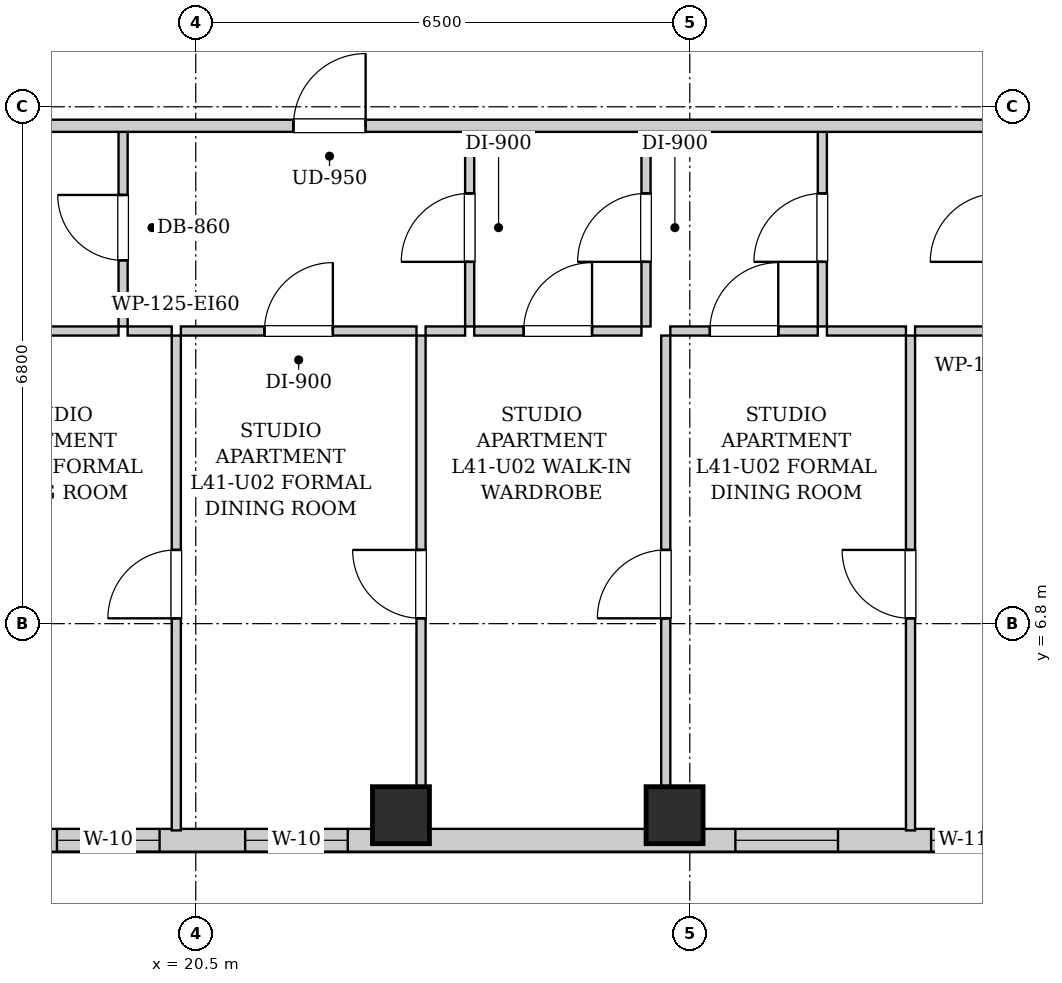
"""IFC4 building model, lengths in metres.
Left out: names, types, materials, properties, quantities, classifications, styles, units other than length and angle.
Written with IfcOpenShell. Run it as: python <this file> out.ifc"""

import sys

from ifc_helpers import new_model, si_unit, direction, frame, frame_2d, origin, origin_2d, place, context, subcontext, project, spatial, rectangle, extrude, element, fill, save


model = new_model("IFC4")
c1 = context("Model", 3, precision=1e-05, world=origin(), true_north=direction((0.0, 1.0)))
c2 = subcontext(c1, "Body", "Model", "MODEL_VIEW")
j1 = project(units=[si_unit("LENGTHUNIT", "METRE"), si_unit("PLANEANGLEUNIT", "RADIAN")], contexts=[c1])
p1 = place(None, origin())
s1 = spatial("IfcSite", under=j1, at=p1, CompositionType="ELEMENT")
p2 = place(p1, origin())
s2 = spatial("IfcBuilding", under=s1, at=p2, CompositionType="ELEMENT")
p3 = place(p2, frame((0.0, 0.0, 143.9)))
s3 = spatial("IfcBuildingStorey", under=s2, at=p3, CompositionType="ELEMENT", Elevation=143.9)
for number, where, z_axis, x_axis in (
    (1, (23.2, 4.28, 0.0), (0.0, 0.0, 1.0), (1.0, 0.0, 0.0)),
    (2, (26.8, 4.28, 0.0), (0.0, 0.0, 1.0), (1.0, 0.0, 0.0)),
):
    element("IfcColumn", number, at=place(p3, frame(where, z_axis=z_axis, x_axis=x_axis)), inside=s3, PredefinedType="COLUMN", context=c2, shape_type="SweptSolid", body=[
        extrude(rectangle(XDim=0.75, YDim=0.75, at=origin_2d()), origin(), (0.0, 0.0, 1.0), 3.25),
    ])
p4 = place(p3, frame((31.5, 3.95, 0.0), z_axis=(0.0, 0.0, 1.0), x_axis=(-1.0, 0.0, 0.0)))
e3 = element("IfcWall", 3, at=p4, inside=s3, PredefinedType="SOLIDWALL", context=c2, shape_type="SweptSolid", body=[
    extrude(rectangle(XDim=13.2, YDim=0.3, at=frame_2d((6.6, 0.0))), origin(), (0.0, 0.0, 1.0), 2.99),
])
p5 = place(p4, frame((11.476, 0.0, 0.55)))
e4 = element("IfcOpeningElement", 4, at=p5, cuts=e3, PredefinedType="OPENING", context=c2, shape_type="SweptSolid", body=[
    extrude(rectangle(XDim=1.35, YDim=1.2, at=frame_2d((0.675, 0.6))), frame((0.0, 0.16, 0.0), z_axis=(0.0, -1.0, 0.0), x_axis=(1.0, 0.0, 0.0)), (0.0, 0.0, 1.0), 0.32),
])
p6 = place(p4, frame((9.0, 0.0, 0.55)))
e5 = element("IfcOpeningElement", 5, at=p6, cuts=e3, PredefinedType="OPENING", context=c2, shape_type="SweptSolid", body=[
    extrude(rectangle(XDim=1.35, YDim=1.2, at=frame_2d((0.675, 0.6))), frame((0.0, 0.16, 0.0), z_axis=(0.0, -1.0, 0.0), x_axis=(1.0, 0.0, 0.0)), (0.0, 0.0, 1.0), 0.32),
])
p7 = place(p4, frame((2.55, 0.0, 0.55)))
e6 = element("IfcOpeningElement", 6, at=p7, cuts=e3, PredefinedType="OPENING", context=c2, shape_type="SweptSolid", body=[
    extrude(rectangle(XDim=1.35, YDim=1.2, at=frame_2d((0.675, 0.6))), frame((0.0, 0.16, 0.0), z_axis=(0.0, -1.0, 0.0), x_axis=(1.0, 0.0, 0.0)), (0.0, 0.0, 1.0), 0.32),
])
p8 = place(p4, frame((0.475, 0.0, 0.55)))
e7 = element("IfcOpeningElement", 7, at=p8, cuts=e3, PredefinedType="OPENING", context=c2, shape_type="SweptSolid", body=[
    extrude(rectangle(XDim=0.85, YDim=1.2, at=frame_2d((0.425, 0.6))), frame((0.0, 0.16, 0.0), z_axis=(0.0, -1.0, 0.0), x_axis=(1.0, 0.0, 0.0)), (0.0, 0.0, 1.0), 0.32),
])
p9 = place(p3, frame((19.544, 10.71, 0.0), z_axis=(0.0, 0.0, 1.0), x_axis=(0.0, 1.0, 0.0)))
e8 = element("IfcWall", 8, at=p9, inside=s3, PredefinedType="PARTITIONING", context=c2, shape_type="SweptSolid", body=[
    extrude(rectangle(XDim=2.6, YDim=0.12, at=frame_2d((1.3, 0.0))), origin(), (0.0, 0.0, 1.0), 2.99),
])
p10 = place(p9, frame((0.87, 0.0, 0.0)))
e9 = element("IfcOpeningElement", 9, at=p10, cuts=e8, PredefinedType="OPENING", context=c2, shape_type="SweptSolid", body=[
    extrude(rectangle(XDim=0.86, YDim=2.05, at=frame_2d((0.43, 1.025))), frame((0.0, 0.07, 0.0), z_axis=(0.0, -1.0, 0.0), x_axis=(1.0, 0.0, 0.0)), (0.0, 0.0, 1.0), 0.14),
])
p11 = place(p3, frame((17.084, 10.65, 0.0), z_axis=(0.0, 0.0, 1.0), x_axis=(1.0, 0.0, 0.0)))
e10 = element("IfcWall", 10, at=p11, inside=s3, PredefinedType="PARTITIONING", context=c2, shape_type="SweptSolid", body=[
    extrude(rectangle(XDim=2.4, YDim=0.12, at=frame_2d((1.2, 0.0))), origin(), (0.0, 0.0, 1.0), 2.99),
])
p12 = place(p3, frame((24.104, 10.71, 0.0), z_axis=(0.0, 0.0, 1.0), x_axis=(0.0, 1.0, 0.0)))
e11 = element("IfcWall", 11, at=p12, inside=s3, PredefinedType="PARTITIONING", context=c2, shape_type="SweptSolid", body=[
    extrude(rectangle(XDim=2.6, YDim=0.12, at=frame_2d((1.3, 0.0))), origin(), (0.0, 0.0, 1.0), 2.99),
])
p13 = place(p12, frame((0.85, 0.0, 0.0)))
e12 = element("IfcOpeningElement", 12, at=p13, cuts=e11, PredefinedType="OPENING", context=c2, shape_type="SweptSolid", body=[
    extrude(rectangle(XDim=0.9, YDim=2.05, at=frame_2d((0.45, 1.025))), frame((0.0, 0.07, 0.0), z_axis=(0.0, -1.0, 0.0), x_axis=(1.0, 0.0, 0.0)), (0.0, 0.0, 1.0), 0.14),
])
p14 = place(p3, frame((19.604, 10.65, 0.0), z_axis=(0.0, 0.0, 1.0), x_axis=(1.0, 0.0, 0.0)))
e13 = element("IfcWall", 13, at=p14, inside=s3, PredefinedType="PARTITIONING", context=c2, shape_type="SweptSolid", body=[
    extrude(rectangle(XDim=0.58, YDim=0.12, at=frame_2d((0.29, 0.0))), origin(), (0.0, 0.0, 1.0), 2.99),
])
p15 = place(p3, frame((20.304, 10.65, 0.0), z_axis=(0.0, 0.0, 1.0), x_axis=(1.0, 0.0, 0.0)))
e14 = element("IfcWall", 14, at=p15, inside=s3, PredefinedType="PARTITIONING", context=c2, shape_type="SweptSolid", body=[
    extrude(rectangle(XDim=3.1, YDim=0.12, at=frame_2d((1.55, 0.0))), origin(), (0.0, 0.0, 1.0), 2.99),
])
p16 = place(p15, frame((1.1, 0.0, 0.0)))
e15 = element("IfcOpeningElement", 15, at=p16, cuts=e14, PredefinedType="OPENING", context=c2, shape_type="SweptSolid", body=[
    extrude(rectangle(XDim=0.9, YDim=2.05, at=frame_2d((0.45, 1.025))), frame((0.0, 0.07, 0.0), z_axis=(0.0, -1.0, 0.0), x_axis=(1.0, 0.0, 0.0)), (0.0, 0.0, 1.0), 0.14),
])
p17 = place(p3, frame((23.524, 10.65, 0.0), z_axis=(0.0, 0.0, 1.0), x_axis=(1.0, 0.0, 0.0)))
e16 = element("IfcWall", 16, at=p17, inside=s3, PredefinedType="PARTITIONING", context=c2, shape_type="SweptSolid", body=[
    extrude(rectangle(XDim=0.52, YDim=0.12, at=frame_2d((0.26, 0.0))), origin(), (0.0, 0.0, 1.0), 2.99),
])
p18 = place(p3, frame((26.424, 10.71, 0.0), z_axis=(0.0, 0.0, 1.0), x_axis=(0.0, 1.0, 0.0)))
e17 = element("IfcWall", 17, at=p18, inside=s3, PredefinedType="PARTITIONING", context=c2, shape_type="SweptSolid", body=[
    extrude(rectangle(XDim=2.6, YDim=0.12, at=frame_2d((1.3, 0.0))), origin(), (0.0, 0.0, 1.0), 2.99),
])
p19 = place(p18, frame((0.85, 0.0, 0.0)))
e18 = element("IfcOpeningElement", 18, at=p19, cuts=e17, PredefinedType="OPENING", context=c2, shape_type="SweptSolid", body=[
    extrude(rectangle(XDim=0.9, YDim=2.05, at=frame_2d((0.45, 1.025))), frame((0.0, 0.07, 0.0), z_axis=(0.0, -1.0, 0.0), x_axis=(1.0, 0.0, 0.0)), (0.0, 0.0, 1.0), 0.14),
])
p20 = place(p3, frame((24.164, 10.65, 0.0), z_axis=(0.0, 0.0, 1.0), x_axis=(1.0, 0.0, 0.0)))
e19 = element("IfcWall", 19, at=p20, inside=s3, PredefinedType="PARTITIONING", context=c2, shape_type="SweptSolid", body=[
    extrude(rectangle(XDim=2.2, YDim=0.12, at=frame_2d((1.1, 0.0))), origin(), (0.0, 0.0, 1.0), 2.99),
])
p21 = place(p20, frame((0.65, 0.0, 0.0)))
e20 = element("IfcOpeningElement", 20, at=p21, cuts=e19, PredefinedType="OPENING", context=c2, shape_type="SweptSolid", body=[
    extrude(rectangle(XDim=0.9, YDim=2.05, at=frame_2d((0.45, 1.025))), frame((0.0, 0.07, 0.0), z_axis=(0.0, -1.0, 0.0), x_axis=(1.0, 0.0, 0.0)), (0.0, 0.0, 1.0), 0.14),
])
p22 = place(p3, frame((28.744, 10.71, 0.0), z_axis=(0.0, 0.0, 1.0), x_axis=(0.0, 1.0, 0.0)))
e21 = element("IfcWall", 21, at=p22, inside=s3, PredefinedType="PARTITIONING", context=c2, shape_type="SweptSolid", body=[
    extrude(rectangle(XDim=2.6, YDim=0.12, at=frame_2d((1.3, 0.0))), origin(), (0.0, 0.0, 1.0), 2.99),
])
p23 = place(p22, frame((0.85, 0.0, 0.0)))
e22 = element("IfcOpeningElement", 22, at=p23, cuts=e21, PredefinedType="OPENING", context=c2, shape_type="SweptSolid", body=[
    extrude(rectangle(XDim=0.9, YDim=2.05, at=frame_2d((0.45, 1.025))), frame((0.0, 0.07, 0.0), z_axis=(0.0, -1.0, 0.0), x_axis=(1.0, 0.0, 0.0)), (0.0, 0.0, 1.0), 0.14),
])
p24 = place(p3, frame((26.744, 10.65, 0.0), z_axis=(0.0, 0.0, 1.0), x_axis=(1.0, 0.0, 0.0)))
e23 = element("IfcWall", 23, at=p24, inside=s3, PredefinedType="PARTITIONING", context=c2, shape_type="SweptSolid", body=[
    extrude(rectangle(XDim=1.94, YDim=0.12, at=frame_2d((0.97, 0.0))), origin(), (0.0, 0.0, 1.0), 2.99),
])
p25 = place(p24, frame((0.52, 0.0, 0.0)))
e24 = element("IfcOpeningElement", 24, at=p25, cuts=e23, PredefinedType="OPENING", context=c2, shape_type="SweptSolid", body=[
    extrude(rectangle(XDim=0.9, YDim=2.05, at=frame_2d((0.45, 1.025))), frame((0.0, 0.07, 0.0), z_axis=(0.0, -1.0, 0.0), x_axis=(1.0, 0.0, 0.0)), (0.0, 0.0, 1.0), 0.14),
])
p26 = place(p3, frame((28.804, 10.65, 0.0), z_axis=(0.0, 0.0, 1.0), x_axis=(1.0, 0.0, 0.0)))
e25 = element("IfcWall", 25, at=p26, inside=s3, PredefinedType="PARTITIONING", context=c2, shape_type="SweptSolid", body=[
    extrude(rectangle(XDim=1.04, YDim=0.12, at=frame_2d((0.52, 0.0))), origin(), (0.0, 0.0, 1.0), 2.99),
])
p27 = place(p3, frame((29.964, 10.65, 0.0), z_axis=(0.0, 0.0, 1.0), x_axis=(1.0, 0.0, 0.0)))
e26 = element("IfcWall", 26, at=p27, inside=s3, PredefinedType="PARTITIONING", context=c2, shape_type="SweptSolid", body=[
    extrude(rectangle(XDim=1.04, YDim=0.12, at=frame_2d((0.52, 0.0))), origin(), (0.0, 0.0, 1.0), 2.99),
])
p28 = place(p3, frame((20.244, 4.08, 0.0), z_axis=(0.0, 0.0, 1.0), x_axis=(0.0, 1.0, 0.0)))
e27 = element("IfcWall", 27, at=p28, inside=s3, PredefinedType="PARTITIONING", context=c2, shape_type="SweptSolid", body=[
    extrude(rectangle(XDim=6.51, YDim=0.12, at=frame_2d((3.255, 0.0))), origin(), (0.0, 0.0, 1.0), 2.99),
])
p29 = place(p28, frame((2.79, 0.0, 0.0)))
e28 = element("IfcOpeningElement", 28, at=p29, cuts=e27, PredefinedType="OPENING", context=c2, shape_type="SweptSolid", body=[
    extrude(rectangle(XDim=0.9, YDim=2.05, at=frame_2d((0.45, 1.025))), frame((0.0, 0.07, 0.0), z_axis=(0.0, -1.0, 0.0), x_axis=(1.0, 0.0, 0.0)), (0.0, 0.0, 1.0), 0.14),
])
p30 = place(p3, frame((23.464, 4.08, 0.0), z_axis=(0.0, 0.0, 1.0), x_axis=(0.0, 1.0, 0.0)))
e29 = element("IfcWall", 29, at=p30, inside=s3, PredefinedType="PARTITIONING", context=c2, shape_type="SweptSolid", body=[
    extrude(rectangle(XDim=6.51, YDim=0.12, at=frame_2d((3.255, 0.0))), origin(), (0.0, 0.0, 1.0), 2.99),
])
p31 = place(p30, frame((2.79, 0.0, 0.0)))
e30 = element("IfcOpeningElement", 30, at=p31, cuts=e29, PredefinedType="OPENING", context=c2, shape_type="SweptSolid", body=[
    extrude(rectangle(XDim=0.9, YDim=2.05, at=frame_2d((0.45, 1.025))), frame((0.0, 0.07, 0.0), z_axis=(0.0, -1.0, 0.0), x_axis=(1.0, 0.0, 0.0)), (0.0, 0.0, 1.0), 0.14),
])
p32 = place(p3, frame((26.684, 4.08, 0.0), z_axis=(0.0, 0.0, 1.0), x_axis=(0.0, 1.0, 0.0)))
e31 = element("IfcWall", 31, at=p32, inside=s3, PredefinedType="PARTITIONING", context=c2, shape_type="SweptSolid", body=[
    extrude(rectangle(XDim=6.51, YDim=0.12, at=frame_2d((3.255, 0.0))), origin(), (0.0, 0.0, 1.0), 2.99),
])
p33 = place(p32, frame((2.79, 0.0, 0.0)))
e32 = element("IfcOpeningElement", 32, at=p33, cuts=e31, PredefinedType="OPENING", context=c2, shape_type="SweptSolid", body=[
    extrude(rectangle(XDim=0.9, YDim=2.05, at=frame_2d((0.45, 1.025))), frame((0.0, 0.07, 0.0), z_axis=(0.0, -1.0, 0.0), x_axis=(1.0, 0.0, 0.0)), (0.0, 0.0, 1.0), 0.14),
])
p34 = place(p3, frame((29.904, 4.08, 0.0), z_axis=(0.0, 0.0, 1.0), x_axis=(0.0, 1.0, 0.0)))
e33 = element("IfcWall", 33, at=p34, inside=s3, PredefinedType="PARTITIONING", context=c2, shape_type="SweptSolid", body=[
    extrude(rectangle(XDim=6.51, YDim=0.12, at=frame_2d((3.255, 0.0))), origin(), (0.0, 0.0, 1.0), 2.99),
])
p35 = place(p34, frame((2.79, 0.0, 0.0)))
e34 = element("IfcOpeningElement", 34, at=p35, cuts=e33, PredefinedType="OPENING", context=c2, shape_type="SweptSolid", body=[
    extrude(rectangle(XDim=0.9, YDim=2.05, at=frame_2d((0.45, 1.025))), frame((0.0, 0.07, 0.0), z_axis=(0.0, -1.0, 0.0), x_axis=(1.0, 0.0, 0.0)), (0.0, 0.0, 1.0), 0.14),
])
p36 = place(p3, frame((10.05, 13.35, 0.0), z_axis=(0.0, 0.0, 1.0), x_axis=(1.0, 0.0, 0.0)))
e35 = element("IfcWall", 35, at=p36, inside=s3, PredefinedType="PARTITIONING", context=c2, shape_type="SweptSolid", body=[
    extrude(rectangle(XDim=27.7, YDim=0.16, at=frame_2d((13.85, 0.0))), origin(), (0.0, 0.0, 1.0), 2.99),
])
p37 = place(p36, frame((4.063, 0.0, 0.0)))
e36 = element("IfcOpeningElement", 36, at=p37, cuts=e35, PredefinedType="OPENING", context=c2, shape_type="SweptSolid", body=[
    extrude(rectangle(XDim=0.95, YDim=2.1, at=frame_2d((0.475, 1.05))), frame((0.0, 0.09, 0.0), z_axis=(0.0, -1.0, 0.0), x_axis=(1.0, 0.0, 0.0)), (0.0, 0.0, 1.0), 0.18),
])
p38 = place(p36, frame((11.735, 0.0, 0.0)))
e37 = element("IfcOpeningElement", 37, at=p38, cuts=e35, PredefinedType="OPENING", context=c2, shape_type="SweptSolid", body=[
    extrude(rectangle(XDim=0.95, YDim=2.1, at=frame_2d((0.475, 1.05))), frame((0.0, 0.09, 0.0), z_axis=(0.0, -1.0, 0.0), x_axis=(1.0, 0.0, 0.0)), (0.0, 0.0, 1.0), 0.18),
])
p39 = place(p10, origin())
e38 = element("IfcDoor", 38, at=p39, inside=s3, OperationType="SINGLE_SWING_RIGHT", PredefinedType="DOOR", context=c2, shape_type="SweptSolid", body=[
    extrude(rectangle(XDim=0.86, YDim=2.05, at=frame_2d((0.43, 1.025))), frame((0.0, 0.025, 0.0), z_axis=(0.0, -1.0, 0.0), x_axis=(1.0, 0.0, 0.0)), (0.0, 0.0, 1.0), 0.05),
])
fill(e9, e38)
p40 = place(p13, origin())
e39 = element("IfcDoor", 39, at=p40, inside=s3, OperationType="SINGLE_SWING_LEFT", PredefinedType="DOOR", context=c2, shape_type="SweptSolid", body=[
    extrude(rectangle(XDim=0.9, YDim=2.05, at=frame_2d((0.45, 1.025))), frame((0.0, 0.025, 0.0), z_axis=(0.0, -1.0, 0.0), x_axis=(1.0, 0.0, 0.0)), (0.0, 0.0, 1.0), 0.05),
])
fill(e12, e39)
p41 = place(p16, origin())
e40 = element("IfcDoor", 40, at=p41, inside=s3, OperationType="SINGLE_SWING_RIGHT", PredefinedType="DOOR", context=c2, shape_type="SweptSolid", body=[
    extrude(rectangle(XDim=0.9, YDim=2.05, at=frame_2d((0.45, 1.025))), frame((0.0, 0.025, 0.0), z_axis=(0.0, -1.0, 0.0), x_axis=(1.0, 0.0, 0.0)), (0.0, 0.0, 1.0), 0.05),
])
fill(e15, e40)
p42 = place(p19, origin())
e41 = element("IfcDoor", 41, at=p42, inside=s3, OperationType="SINGLE_SWING_LEFT", PredefinedType="DOOR", context=c2, shape_type="SweptSolid", body=[
    extrude(rectangle(XDim=0.9, YDim=2.05, at=frame_2d((0.45, 1.025))), frame((0.0, 0.025, 0.0), z_axis=(0.0, -1.0, 0.0), x_axis=(1.0, 0.0, 0.0)), (0.0, 0.0, 1.0), 0.05),
])
fill(e18, e41)
p43 = place(p21, origin())
e42 = element("IfcDoor", 42, at=p43, inside=s3, OperationType="SINGLE_SWING_RIGHT", PredefinedType="DOOR", context=c2, shape_type="SweptSolid", body=[
    extrude(rectangle(XDim=0.9, YDim=2.05, at=frame_2d((0.45, 1.025))), frame((0.0, 0.025, 0.0), z_axis=(0.0, -1.0, 0.0), x_axis=(1.0, 0.0, 0.0)), (0.0, 0.0, 1.0), 0.05),
])
fill(e20, e42)
p44 = place(p23, origin())
e43 = element("IfcDoor", 43, at=p44, inside=s3, OperationType="SINGLE_SWING_LEFT", PredefinedType="DOOR", context=c2, shape_type="SweptSolid", body=[
    extrude(rectangle(XDim=0.9, YDim=2.05, at=frame_2d((0.45, 1.025))), frame((0.0, 0.025, 0.0), z_axis=(0.0, -1.0, 0.0), x_axis=(1.0, 0.0, 0.0)), (0.0, 0.0, 1.0), 0.05),
])
fill(e22, e43)
p45 = place(p25, origin())
e44 = element("IfcDoor", 44, at=p45, inside=s3, OperationType="SINGLE_SWING_RIGHT", PredefinedType="DOOR", context=c2, shape_type="SweptSolid", body=[
    extrude(rectangle(XDim=0.9, YDim=2.05, at=frame_2d((0.45, 1.025))), frame((0.0, 0.025, 0.0), z_axis=(0.0, -1.0, 0.0), x_axis=(1.0, 0.0, 0.0)), (0.0, 0.0, 1.0), 0.05),
])
fill(e24, e44)
p46 = place(p29, origin())
e45 = element("IfcDoor", 45, at=p46, inside=s3, OperationType="SINGLE_SWING_LEFT", PredefinedType="DOOR", context=c2, shape_type="SweptSolid", body=[
    extrude(rectangle(XDim=0.9, YDim=2.05, at=frame_2d((0.45, 1.025))), frame((0.0, 0.025, 0.0), z_axis=(0.0, -1.0, 0.0), x_axis=(1.0, 0.0, 0.0)), (0.0, 0.0, 1.0), 0.05),
])
fill(e28, e45)
p47 = place(p31, origin())
e46 = element("IfcDoor", 46, at=p47, inside=s3, OperationType="SINGLE_SWING_RIGHT", PredefinedType="DOOR", context=c2, shape_type="SweptSolid", body=[
    extrude(rectangle(XDim=0.9, YDim=2.05, at=frame_2d((0.45, 1.025))), frame((0.0, 0.025, 0.0), z_axis=(0.0, -1.0, 0.0), x_axis=(1.0, 0.0, 0.0)), (0.0, 0.0, 1.0), 0.05),
])
fill(e30, e46)
p48 = place(p33, origin())
e47 = element("IfcDoor", 47, at=p48, inside=s3, OperationType="SINGLE_SWING_LEFT", PredefinedType="DOOR", context=c2, shape_type="SweptSolid", body=[
    extrude(rectangle(XDim=0.9, YDim=2.05, at=frame_2d((0.45, 1.025))), frame((0.0, 0.025, 0.0), z_axis=(0.0, -1.0, 0.0), x_axis=(1.0, 0.0, 0.0)), (0.0, 0.0, 1.0), 0.05),
])
fill(e32, e47)
p49 = place(p35, origin())
e48 = element("IfcDoor", 48, at=p49, inside=s3, OperationType="SINGLE_SWING_RIGHT", PredefinedType="DOOR", context=c2, shape_type="SweptSolid", body=[
    extrude(rectangle(XDim=0.9, YDim=2.05, at=frame_2d((0.45, 1.025))), frame((0.0, 0.025, 0.0), z_axis=(0.0, -1.0, 0.0), x_axis=(1.0, 0.0, 0.0)), (0.0, 0.0, 1.0), 0.05),
])
fill(e34, e48)
p50 = place(p38, origin())
e49 = element("IfcDoor", 49, at=p50, inside=s3, OperationType="SINGLE_SWING_RIGHT", PredefinedType="DOOR", context=c2, shape_type="SweptSolid", body=[
    extrude(rectangle(XDim=0.95, YDim=2.1, at=frame_2d((0.475, 1.05))), frame((0.0, 0.025, 0.0), z_axis=(0.0, -1.0, 0.0), x_axis=(1.0, 0.0, 0.0)), (0.0, 0.0, 1.0), 0.05),
])
fill(e37, e49)
p51 = place(p5, origin())
e50 = element("IfcWindow", 50, at=p51, inside=s3, PartitioningType="SINGLE_PANEL", PredefinedType="WINDOW", context=c2, shape_type="SweptSolid", body=[
    extrude(rectangle(XDim=1.35, YDim=1.2, at=frame_2d((0.675, 0.6))), frame((0.0, 0.03, 0.0), z_axis=(0.0, -1.0, 0.0), x_axis=(1.0, 0.0, 0.0)), (0.0, 0.0, 1.0), 0.06),
])
fill(e4, e50)
p52 = place(p6, origin())
e51 = element("IfcWindow", 51, at=p52, inside=s3, PartitioningType="SINGLE_PANEL", PredefinedType="WINDOW", context=c2, shape_type="SweptSolid", body=[
    extrude(rectangle(XDim=1.35, YDim=1.2, at=frame_2d((0.675, 0.6))), frame((0.0, 0.03, 0.0), z_axis=(0.0, -1.0, 0.0), x_axis=(1.0, 0.0, 0.0)), (0.0, 0.0, 1.0), 0.06),
])
fill(e5, e51)
p53 = place(p7, origin())
e52 = element("IfcWindow", 52, at=p53, inside=s3, PartitioningType="SINGLE_PANEL", PredefinedType="WINDOW", context=c2, shape_type="SweptSolid", body=[
    extrude(rectangle(XDim=1.35, YDim=1.2, at=frame_2d((0.675, 0.6))), frame((0.0, 0.03, 0.0), z_axis=(0.0, -1.0, 0.0), x_axis=(1.0, 0.0, 0.0)), (0.0, 0.0, 1.0), 0.06),
])
fill(e6, e52)
p54 = place(p8, origin())
e53 = element("IfcWindow", 53, at=p54, inside=s3, PartitioningType="SINGLE_PANEL", PredefinedType="WINDOW", context=c2, shape_type="SweptSolid", body=[
    extrude(rectangle(XDim=0.85, YDim=1.2, at=frame_2d((0.425, 0.6))), frame((0.0, 0.03, 0.0), z_axis=(0.0, -1.0, 0.0), x_axis=(1.0, 0.0, 0.0)), (0.0, 0.0, 1.0), 0.06),
])
fill(e7, e53)
save(model, sys.argv[1])
